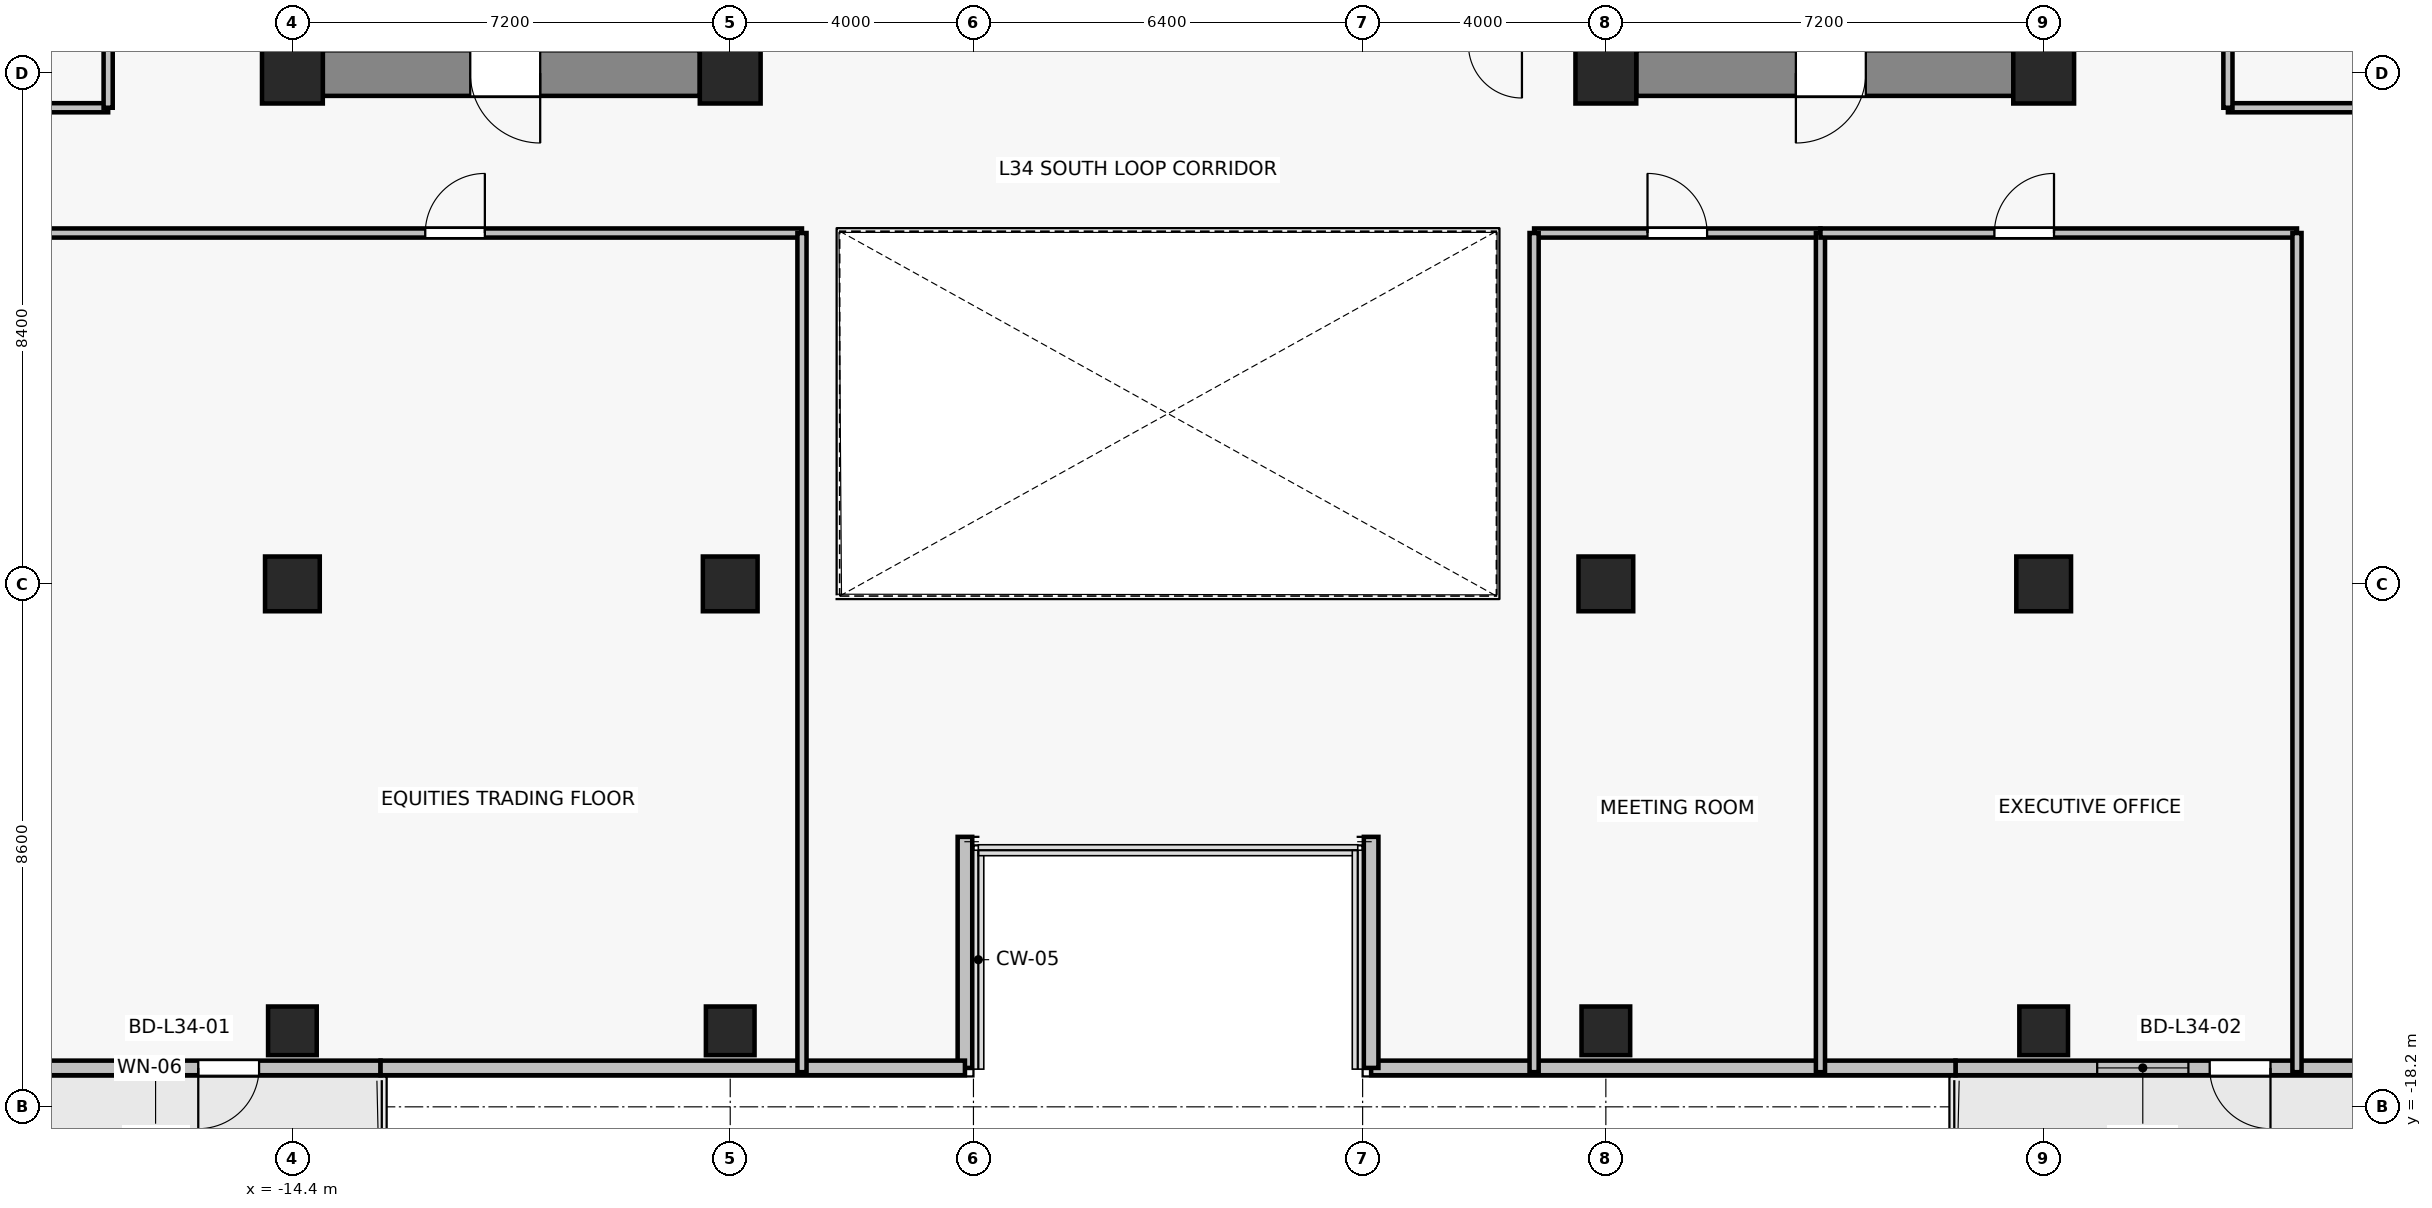
"""IFC4 building model, lengths in metres.
Left out: names, types, materials, properties, quantities, classifications, styles, units other than length and angle.
Written with IfcOpenShell. Run it as: python <this file> out.ifc"""

import sys

from ifc_helpers import new_model, si_unit, direction, frame, frame_2d, origin, origin_2d, place, context, subcontext, project, spatial, rectangle, extrude, source, transform, mapped, element, fill, save


model = new_model("IFC4")
c1 = context("Model", 3, precision=1e-05, world=origin(), true_north=direction((0.0, 1.0)))
c2 = subcontext(c1, "Body", "Model", "MODEL_VIEW")
j1 = project(units=[si_unit("LENGTHUNIT", "METRE"), si_unit("PLANEANGLEUNIT", "RADIAN")], contexts=[c1])
p1 = place(None, origin())
s1 = spatial("IfcSite", under=j1, at=p1, CompositionType="ELEMENT")
p2 = place(p1, origin())
s2 = spatial("IfcBuilding", under=s1, at=p2, CompositionType="ELEMENT")
p3 = place(p2, frame((0.0, 0.0, 123.1)))
s3 = spatial("IfcBuildingStorey", under=s2, at=p3, CompositionType="ELEMENT", Elevation=123.1)
for number, where, z_axis, x_axis in (
    (1, (-14.4, -1.2, 0.0), (0.0, 0.0, 1.0), (1.0, 0.0, 0.0)),
    (2, (-7.2, -1.2, 0.0), (0.0, 0.0, 1.0), (1.0, 0.0, 0.0)),
    (3, (7.2, -1.2, 0.0), (0.0, 0.0, 1.0), (1.0, 0.0, 0.0)),
    (4, (14.4, -1.2, 0.0), (0.0, 0.0, 1.0), (1.0, 0.0, 0.0)),
):
    element("IfcColumn", number, at=place(p3, frame(where, z_axis=z_axis, x_axis=x_axis)), inside=s3, PredefinedType="COLUMN", context=c2, shape_type="SweptSolid", body=[
        extrude(rectangle(XDim=1.0, YDim=1.0, at=origin_2d()), origin(), (0.0, 0.0, 1.0), 3.3),
    ])
for number, where, z_axis, x_axis in (
    (5, (-14.4, -9.6, 0.0), (0.0, 0.0, 1.0), (1.0, 0.0, 0.0)),
    (6, (-7.2, -9.6, 0.0), (0.0, 0.0, 1.0), (1.0, 0.0, 0.0)),
    (7, (7.2, -9.6, 0.0), (0.0, 0.0, 1.0), (1.0, 0.0, 0.0)),
    (8, (14.4, -9.6, 0.0), (0.0, 0.0, 1.0), (1.0, 0.0, 0.0)),
):
    element("IfcColumn", number, at=place(p3, frame(where, z_axis=z_axis, x_axis=x_axis)), inside=s3, PredefinedType="COLUMN", context=c2, shape_type="SweptSolid", body=[
        extrude(rectangle(XDim=0.9, YDim=0.9, at=origin_2d()), origin(), (0.0, 0.0, 1.0), 3.3),
    ])
for number, where, z_axis, x_axis in (
    (9, (-14.4, -16.95, 0.0), (0.0, 0.0, 1.0), (1.0, 0.0, 0.0)),
    (10, (-7.2, -16.95, 0.0), (0.0, 0.0, 1.0), (1.0, 0.0, 0.0)),
    (11, (7.2, -16.95, 0.0), (0.0, 0.0, 1.0), (1.0, 0.0, 0.0)),
    (12, (14.4, -16.95, 0.0), (0.0, 0.0, 1.0), (1.0, 0.0, 0.0)),
):
    element("IfcColumn", number, at=place(p3, frame(where, z_axis=z_axis, x_axis=x_axis)), inside=s3, PredefinedType="COLUMN", context=c2, shape_type="SweptSolid", body=[
        extrude(rectangle(XDim=0.8, YDim=0.8, at=origin_2d()), origin(), (0.0, 0.0, 1.0), 3.3),
    ])
p4 = place(p3, frame((-7.7, -1.2, 0.0), z_axis=(0.0, 0.0, 1.0), x_axis=(-1.0, 0.0, 0.0)))
e13 = element("IfcWall", 13, at=p4, inside=s3, PredefinedType="SHEAR", context=c2, shape_type="SweptSolid", body=[
    extrude(rectangle(XDim=6.2, YDim=0.75, at=frame_2d((3.1, 0.0))), origin(), (0.0, 0.0, 1.0), 3.075),
])
p5 = place(p4, frame((2.625, 0.0, 0.0)))
e14 = element("IfcOpeningElement", 14, at=p5, cuts=e13, PredefinedType="OPENING", context=c2, shape_type="SweptSolid", body=[
    extrude(rectangle(XDim=1.15, YDim=2.15, at=frame_2d((0.575, 1.075))), frame((0.0, 0.385, 0.0), z_axis=(0.0, -1.0, 0.0), x_axis=(1.0, 0.0, 0.0)), (0.0, 0.0, 1.0), 0.77),
])
p6 = place(p3, frame((13.9, -1.2, 0.0), z_axis=(0.0, 0.0, 1.0), x_axis=(-1.0, 0.0, 0.0)))
e15 = element("IfcWall", 15, at=p6, inside=s3, PredefinedType="SHEAR", context=c2, shape_type="SweptSolid", body=[
    extrude(rectangle(XDim=6.2, YDim=0.75, at=frame_2d((3.1, 0.0))), origin(), (0.0, 0.0, 1.0), 3.075),
])
p7 = place(p6, frame((2.425, 0.0, 0.0)))
e16 = element("IfcOpeningElement", 16, at=p7, cuts=e15, PredefinedType="OPENING", context=c2, shape_type="SweptSolid", body=[
    extrude(rectangle(XDim=1.15, YDim=2.15, at=frame_2d((0.575, 1.075))), frame((0.0, 0.385, 0.0), z_axis=(0.0, -1.0, 0.0), x_axis=(1.0, 0.0, 0.0)), (0.0, 0.0, 1.0), 0.77),
])
p8 = place(p3, frame((-12.95, -17.56, 0.0), z_axis=(0.0, 0.0, 1.0), x_axis=(-1.0, 0.0, 0.0)))
e17 = element("IfcWall", 17, at=p8, inside=s3, PredefinedType="SOLIDWALL", context=c2, shape_type="SweptSolid", body=[
    extrude(rectangle(XDim=7.4, YDim=0.24, at=frame_2d((3.7, 0.0))), origin(), (0.0, 0.0, 1.0), 2.665),
])
p9 = place(p8, frame((1.998, 0.0, 0.0)))
e18 = element("IfcOpeningElement", 18, at=p9, cuts=e17, PredefinedType="OPENING", context=c2, shape_type="SweptSolid", body=[
    extrude(rectangle(XDim=1.0, YDim=2.2, at=frame_2d((0.5, 1.1))), frame((0.0, 0.13, 0.0), z_axis=(0.0, -1.0, 0.0), x_axis=(1.0, 0.0, 0.0)), (0.0, 0.0, 1.0), 0.26),
])
p10 = place(p8, frame((3.348, 0.0, 0.85)))
e19 = element("IfcOpeningElement", 19, at=p10, cuts=e17, PredefinedType="OPENING", context=c2, shape_type="SweptSolid", body=[
    extrude(rectangle(XDim=0.9, YDim=1.35, at=frame_2d((0.45, 0.675))), frame((0.0, 0.13, 0.0), z_axis=(0.0, -1.0, 0.0), x_axis=(1.0, 0.0, 0.0)), (0.0, 0.0, 1.0), 0.26),
])
p11 = place(p3, frame((20.35, -17.56, 0.0), z_axis=(0.0, 0.0, 1.0), x_axis=(-1.0, 0.0, 0.0)))
e20 = element("IfcWall", 20, at=p11, inside=s3, PredefinedType="SOLIDWALL", context=c2, shape_type="SweptSolid", body=[
    extrude(rectangle(XDim=7.4, YDim=0.24, at=frame_2d((3.7, 0.0))), origin(), (0.0, 0.0, 1.0), 2.665),
])
p12 = place(p11, frame((2.22, 0.0, 0.0)))
e21 = element("IfcOpeningElement", 21, at=p12, cuts=e20, PredefinedType="OPENING", context=c2, shape_type="SweptSolid", body=[
    extrude(rectangle(XDim=1.0, YDim=2.2, at=frame_2d((0.5, 1.1))), frame((0.0, 0.13, 0.0), z_axis=(0.0, -1.0, 0.0), x_axis=(1.0, 0.0, 0.0)), (0.0, 0.0, 1.0), 0.26),
])
p13 = place(p11, frame((3.57, 0.0, 0.85)))
e22 = element("IfcOpeningElement", 22, at=p13, cuts=e20, PredefinedType="OPENING", context=c2, shape_type="SweptSolid", body=[
    extrude(rectangle(XDim=1.5, YDim=1.6, at=frame_2d((0.75, 0.8))), frame((0.0, 0.13, 0.0), z_axis=(0.0, -1.0, 0.0), x_axis=(1.0, 0.0, 0.0)), (0.0, 0.0, 1.0), 0.26),
])
p14 = place(p3, frame((3.34, -17.56, 0.0), z_axis=(0.0, 0.0, 1.0), x_axis=(1.0, 0.0, 0.0)))
e23 = element("IfcWall", 23, at=p14, inside=s3, PredefinedType="SOLIDWALL", context=c2, shape_type="SweptSolid", body=[
    extrude(rectangle(XDim=9.61, YDim=0.24, at=frame_2d((4.805, 0.0))), origin(), (0.0, 0.0, 1.0), 2.665),
])
for number, where, z_axis, x_axis in (
    (24, (3.34, -13.76, 0.0), (0.0, 0.0, 1.0), (0.0, -1.0, 0.0)),
    (25, (-3.34, -17.56, 0.0), (0.0, 0.0, 1.0), (0.0, 1.0, 0.0)),
):
    element("IfcWall", number, at=place(p3, frame(where, z_axis=z_axis, x_axis=x_axis)), inside=s3, PredefinedType="SOLIDWALL", context=c2, shape_type="SweptSolid", body=[
        extrude(rectangle(XDim=3.8, YDim=0.24, at=frame_2d((1.9, 0.0))), origin(), (0.0, 0.0, 1.0), 2.515),
    ])
p15 = place(p3, frame((-12.95, -17.56, 0.0), z_axis=(0.0, 0.0, 1.0), x_axis=(1.0, 0.0, 0.0)))
e26 = element("IfcWall", 26, at=p15, inside=s3, PredefinedType="SOLIDWALL", context=c2, shape_type="SweptSolid", body=[
    extrude(rectangle(XDim=9.61, YDim=0.24, at=frame_2d((4.805, 0.0))), origin(), (0.0, 0.0, 1.0), 2.665),
])
p16 = place(p3, frame((-25.53, -3.83, 0.0), z_axis=(0.0, 0.0, 1.0), x_axis=(1.0, 0.0, 0.0)))
e27 = element("IfcWall", 27, at=p16, inside=s3, PredefinedType="PARTITIONING", context=c2, shape_type="SweptSolid", body=[
    extrude(rectangle(XDim=19.51, YDim=0.15, at=frame_2d((9.755, 0.0))), origin(), (0.0, 0.0, 1.0), 2.515),
])
p17 = place(p16, frame((13.315, 0.0, 0.0)))
e28 = element("IfcOpeningElement", 28, at=p17, cuts=e27, PredefinedType="OPENING", context=c2, shape_type="SweptSolid", body=[
    extrude(rectangle(XDim=0.98, YDim=2.15, at=frame_2d((0.49, 1.075))), frame((0.0, 0.085, 0.0), z_axis=(0.0, -1.0, 0.0), x_axis=(1.0, 0.0, 0.0)), (0.0, 0.0, 1.0), 0.17),
])
p18 = place(p3, frame((-6.02, -3.83, 0.0), z_axis=(0.0, 0.0, 1.0), x_axis=(0.0, -1.0, 0.0)))
e29 = element("IfcWall", 29, at=p18, inside=s3, PredefinedType="PARTITIONING", context=c2, shape_type="SweptSolid", body=[
    extrude(rectangle(XDim=13.8, YDim=0.15, at=frame_2d((6.9, 0.0))), origin(), (0.0, 0.0, 1.0), 2.515),
])
p19 = place(p3, frame((6.02, -3.83, 0.0), z_axis=(0.0, 0.0, 1.0), x_axis=(1.0, 0.0, 0.0)))
e30 = element("IfcWall", 30, at=p19, inside=s3, PredefinedType="PARTITIONING", context=c2, shape_type="SweptSolid", body=[
    extrude(rectangle(XDim=4.709, YDim=0.15, at=frame_2d((2.354, 0.0))), origin(), (0.0, 0.0, 1.0), 2.515),
])
p20 = place(p19, frame((1.865, 0.0, 0.0)))
e31 = element("IfcOpeningElement", 31, at=p20, cuts=e30, PredefinedType="OPENING", context=c2, shape_type="SweptSolid", body=[
    extrude(rectangle(XDim=0.98, YDim=2.15, at=frame_2d((0.49, 1.075))), frame((0.0, 0.085, 0.0), z_axis=(0.0, -1.0, 0.0), x_axis=(1.0, 0.0, 0.0)), (0.0, 0.0, 1.0), 0.17),
])
for number, where, z_axis, x_axis in (
    (32, (6.02, -17.63, 0.0), (0.0, 0.0, 1.0), (0.0, 1.0, 0.0)),
    (33, (10.729, -3.83, 0.0), (0.0, 0.0, 1.0), (0.0, -1.0, 0.0)),
):
    element("IfcWall", number, at=place(p3, frame(where, z_axis=z_axis, x_axis=x_axis)), inside=s3, PredefinedType="PARTITIONING", context=c2, shape_type="SweptSolid", body=[
        extrude(rectangle(XDim=13.8, YDim=0.15, at=frame_2d((6.9, 0.0))), origin(), (0.0, 0.0, 1.0), 2.515),
    ])
p21 = place(p3, frame((10.729, -3.83, 0.0), z_axis=(0.0, 0.0, 1.0), x_axis=(1.0, 0.0, 0.0)))
e34 = element("IfcWall", 34, at=p21, inside=s3, PredefinedType="PARTITIONING", context=c2, shape_type="SweptSolid", body=[
    extrude(rectangle(XDim=7.837, YDim=0.15, at=frame_2d((3.918, 0.0))), origin(), (0.0, 0.0, 1.0), 2.515),
])
p22 = place(p21, frame((2.861, 0.0, 0.0)))
e35 = element("IfcOpeningElement", 35, at=p22, cuts=e34, PredefinedType="OPENING", context=c2, shape_type="SweptSolid", body=[
    extrude(rectangle(XDim=0.98, YDim=2.15, at=frame_2d((0.49, 1.075))), frame((0.0, 0.085, 0.0), z_axis=(0.0, -1.0, 0.0), x_axis=(1.0, 0.0, 0.0)), (0.0, 0.0, 1.0), 0.17),
])
p23 = place(p3, frame((18.566, -3.83, 0.0), z_axis=(0.0, 0.0, 1.0), x_axis=(0.0, -1.0, 0.0)))
e36 = element("IfcWall", 36, at=p23, inside=s3, PredefinedType="PARTITIONING", context=c2, shape_type="SweptSolid", body=[
    extrude(rectangle(XDim=13.8, YDim=0.15, at=frame_2d((6.9, 0.0))), origin(), (0.0, 0.0, 1.0), 2.515),
])
p24 = place(p3, frame((-17.43, -1.77, 0.0), z_axis=(0.0, 0.0, 1.0), x_axis=(-1.0, 0.0, 0.0)))
e37 = element("IfcWall", 37, at=p24, inside=s3, PredefinedType="PARTITIONING", context=c2, shape_type="SweptSolid", body=[
    extrude(rectangle(XDim=8.1, YDim=0.15, at=frame_2d((4.05, 0.0))), origin(), (0.0, 0.0, 1.0), 2.515),
])
p25 = place(p3, frame((-17.43, 13.88, 0.0), z_axis=(0.0, 0.0, 1.0), x_axis=(0.0, -1.0, 0.0)))
e38 = element("IfcWall", 38, at=p25, inside=s3, PredefinedType="PARTITIONING", context=c2, shape_type="SweptSolid", body=[
    extrude(rectangle(XDim=15.65, YDim=0.15, at=frame_2d((7.825, 0.0))), origin(), (0.0, 0.0, 1.0), 2.515),
])
p26 = place(p25, frame((7.335, 0.0, 0.0)))
e39 = element("IfcOpeningElement", 39, at=p26, cuts=e38, PredefinedType="OPENING", context=c2, shape_type="SweptSolid", body=[
    extrude(rectangle(XDim=0.98, YDim=2.15, at=frame_2d((0.49, 1.075))), frame((0.0, 0.085, 0.0), z_axis=(0.0, -1.0, 0.0), x_axis=(1.0, 0.0, 0.0)), (0.0, 0.0, 1.0), 0.17),
])
p27 = place(p3, frame((29.53, -1.77, 0.0), z_axis=(0.0, 0.0, 1.0), x_axis=(-1.0, 0.0, 0.0)))
e40 = element("IfcWall", 40, at=p27, inside=s3, PredefinedType="PARTITIONING", context=c2, shape_type="SweptSolid", body=[
    extrude(rectangle(XDim=12.1, YDim=0.15, at=frame_2d((6.05, 0.0))), origin(), (0.0, 0.0, 1.0), 2.515),
])
p28 = place(p3, frame((17.43, -1.77, 0.0), z_axis=(0.0, 0.0, 1.0), x_axis=(0.0, 1.0, 0.0)))
e41 = element("IfcWall", 41, at=p28, inside=s3, PredefinedType="PARTITIONING", context=c2, shape_type="SweptSolid", body=[
    extrude(rectangle(XDim=3.23, YDim=0.15, at=frame_2d((1.615, 0.0))), origin(), (0.0, 0.0, 1.0), 2.515),
])
p29 = place(p28, frame((1.125, 0.0, 0.0)))
e42 = element("IfcOpeningElement", 42, at=p29, cuts=e41, PredefinedType="OPENING", context=c2, shape_type="SweptSolid", body=[
    extrude(rectangle(XDim=0.98, YDim=2.15, at=frame_2d((0.49, 1.075))), frame((0.0, 0.085, 0.0), z_axis=(0.0, -1.0, 0.0), x_axis=(1.0, 0.0, 0.0)), (0.0, 0.0, 1.0), 0.17),
])
m1 = source(origin(), c2, "Body", "SweptSolid", [
    extrude(rectangle(XDim=1.0, YDim=2.2, at=frame_2d((0.5, 1.1))), frame((0.0, 0.025, 0.0), z_axis=(0.0, -1.0, 0.0), x_axis=(1.0, 0.0, 0.0)), (0.0, 0.0, 1.0), 0.05),
])
p30 = place(p9, origin())
e43 = element("IfcDoor", 43, at=p30, inside=s3, OperationType="SINGLE_SWING_RIGHT", PredefinedType="DOOR", context=c2, shape_type="MappedRepresentation", body=[
    mapped(m1, transform((0.0, 0.0, 0.0), x_axis=(1.0, 0.0, 0.0), y_axis=(0.0, 1.0, 0.0), z_axis=(0.0, 0.0, 1.0), scale=1.0)),
])
fill(e18, e43)
m2 = source(origin(), c2, "Body", "SweptSolid", [
    extrude(rectangle(XDim=0.9, YDim=1.35, at=frame_2d((0.45, 0.675))), frame((0.0, 0.03, 0.0), z_axis=(0.0, -1.0, 0.0), x_axis=(1.0, 0.0, 0.0)), (0.0, 0.0, 1.0), 0.06),
])
p31 = place(p10, origin())
e44 = element("IfcWindow", 44, at=p31, inside=s3, PartitioningType="SINGLE_PANEL", PredefinedType="WINDOW", context=c2, shape_type="MappedRepresentation", body=[
    mapped(m2, transform((0.0, 0.0, 0.0), x_axis=(1.0, 0.0, 0.0), y_axis=(0.0, 1.0, 0.0), z_axis=(0.0, 0.0, 1.0), scale=1.0)),
])
fill(e19, e44)
p32 = place(p12, origin())
e45 = element("IfcDoor", 45, at=p32, inside=s3, OperationType="SINGLE_SWING_LEFT", PredefinedType="DOOR", context=c2, shape_type="MappedRepresentation", body=[
    mapped(m1, transform((0.0, 0.0, 0.0), x_axis=(1.0, 0.0, 0.0), y_axis=(0.0, 1.0, 0.0), z_axis=(0.0, 0.0, 1.0), scale=1.0)),
])
fill(e21, e45)
m3 = source(origin(), c2, "Body", "SweptSolid", [
    extrude(rectangle(XDim=1.5, YDim=1.6, at=frame_2d((0.75, 0.8))), frame((0.0, 0.03, 0.0), z_axis=(0.0, -1.0, 0.0), x_axis=(1.0, 0.0, 0.0)), (0.0, 0.0, 1.0), 0.06),
])
p33 = place(p13, origin())
e46 = element("IfcWindow", 46, at=p33, inside=s3, PartitioningType="SINGLE_PANEL", PredefinedType="WINDOW", context=c2, shape_type="MappedRepresentation", body=[
    mapped(m3, transform((0.0, 0.0, 0.0), x_axis=(1.0, 0.0, 0.0), y_axis=(0.0, 1.0, 0.0), z_axis=(0.0, 0.0, 1.0), scale=1.0)),
])
fill(e22, e46)
m4 = source(origin(), c2, "Body", "SweptSolid", [
    extrude(rectangle(XDim=1.15, YDim=2.15, at=frame_2d((0.575, 1.075))), frame((0.0, 0.025, 0.0), z_axis=(0.0, -1.0, 0.0), x_axis=(1.0, 0.0, 0.0)), (0.0, 0.0, 1.0), 0.05),
])
p34 = place(p5, origin())
e47 = element("IfcDoor", 47, at=p34, inside=s3, OperationType="SINGLE_SWING_LEFT", PredefinedType="DOOR", context=c2, shape_type="MappedRepresentation", body=[
    mapped(m4, transform((0.0, 0.0, 0.0), x_axis=(1.0, 0.0, 0.0), y_axis=(0.0, 1.0, 0.0), z_axis=(0.0, 0.0, 1.0), scale=1.0)),
])
fill(e14, e47)
p35 = place(p7, origin())
e48 = element("IfcDoor", 48, at=p35, inside=s3, OperationType="SINGLE_SWING_RIGHT", PredefinedType="DOOR", context=c2, shape_type="MappedRepresentation", body=[
    mapped(m4, transform((0.0, 0.0, 0.0), x_axis=(1.0, 0.0, 0.0), y_axis=(0.0, 1.0, 0.0), z_axis=(0.0, 0.0, 1.0), scale=1.0)),
])
fill(e16, e48)
m5 = source(origin(), c2, "Body", "SweptSolid", [
    extrude(rectangle(XDim=0.98, YDim=2.15, at=frame_2d((0.49, 1.075))), frame((0.0, 0.025, 0.0), z_axis=(0.0, -1.0, 0.0), x_axis=(1.0, 0.0, 0.0)), (0.0, 0.0, 1.0), 0.05),
])
p36 = place(p17, origin())
e49 = element("IfcDoor", 49, at=p36, inside=s3, OperationType="SINGLE_SWING_RIGHT", PredefinedType="DOOR", context=c2, shape_type="MappedRepresentation", body=[
    mapped(m5, transform((0.0, 0.0, 0.0), x_axis=(1.0, 0.0, 0.0), y_axis=(0.0, 1.0, 0.0), z_axis=(0.0, 0.0, 1.0), scale=1.0)),
])
fill(e28, e49)
p37 = place(p20, origin())
e50 = element("IfcDoor", 50, at=p37, inside=s3, OperationType="SINGLE_SWING_LEFT", PredefinedType="DOOR", context=c2, shape_type="MappedRepresentation", body=[
    mapped(m5, transform((0.0, 0.0, 0.0), x_axis=(1.0, 0.0, 0.0), y_axis=(0.0, 1.0, 0.0), z_axis=(0.0, 0.0, 1.0), scale=1.0)),
])
fill(e31, e50)
p38 = place(p22, origin())
e51 = element("IfcDoor", 51, at=p38, inside=s3, OperationType="SINGLE_SWING_RIGHT", PredefinedType="DOOR", context=c2, shape_type="MappedRepresentation", body=[
    mapped(m5, transform((0.0, 0.0, 0.0), x_axis=(1.0, 0.0, 0.0), y_axis=(0.0, 1.0, 0.0), z_axis=(0.0, 0.0, 1.0), scale=1.0)),
])
fill(e35, e51)
save(model, sys.argv[1])
